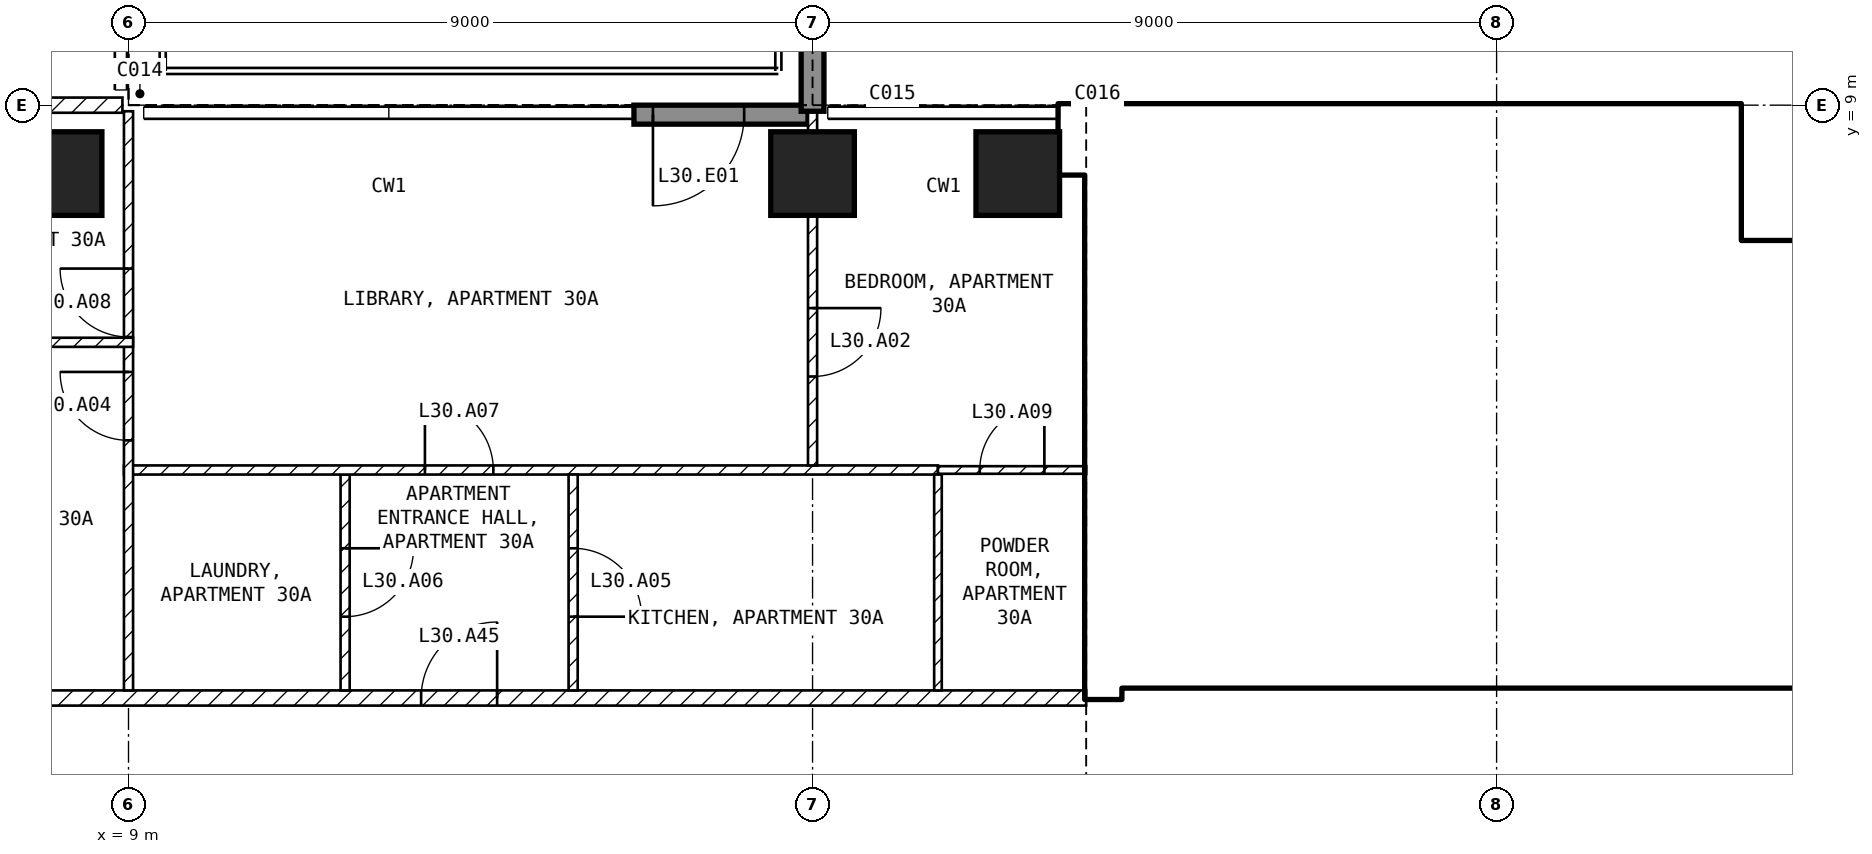
"""IFC4 building model, lengths in metres.
Left out: names, types, materials, properties, quantities, classifications, styles, units other than length and angle.
Written with IfcOpenShell. Run it as: python <this file> out.ifc"""

import sys

from ifc_helpers import new_model, si_unit, direction, frame, frame_2d, origin, origin_2d, place, context, subcontext, project, spatial, rectangle, extrude, element, fill, save


model = new_model("IFC4")
c1 = context("Model", 3, precision=1e-05, world=origin(), true_north=direction((0.0, 1.0)))
c2 = subcontext(c1, "Body", "Model", "MODEL_VIEW")
j1 = project(units=[si_unit("LENGTHUNIT", "METRE"), si_unit("PLANEANGLEUNIT", "RADIAN")], contexts=[c1])
p1 = place(None, origin())
s1 = spatial("IfcSite", under=j1, at=p1, CompositionType="ELEMENT")
p2 = place(p1, origin())
s2 = spatial("IfcBuilding", under=s1, at=p2, CompositionType="ELEMENT")
p3 = place(p2, frame((0.0, 0.0, 126.9)))
s3 = spatial("IfcBuildingStorey", under=s2, at=p3, CompositionType="ELEMENT", Elevation=126.9)
for number, where, z_axis, x_axis in (
    (1, (8.1, 8.1, -0.25), (0.0, 0.0, 1.0), (1.0, 0.0, 0.0)),
    (2, (18.0, 8.1, -0.25), (0.0, 0.0, 1.0), (1.0, 0.0, 0.0)),
    (3, (20.7, 8.1, -0.25), (0.0, 0.0, 1.0), (1.0, 0.0, 0.0)),
):
    element("IfcColumn", number, at=place(p3, frame(where, z_axis=z_axis, x_axis=x_axis)), inside=s3, PredefinedType="COLUMN", context=c2, shape_type="SweptSolid", body=[
        extrude(rectangle(XDim=1.1, YDim=1.1, at=origin_2d()), origin(), (0.0, 0.0, 1.0), 3.5),
    ])
p4 = place(p3, frame((17.94, 8.875, 0.0), z_axis=(0.0, 0.0, 1.0), x_axis=(-1.0, 0.0, 0.0)))
e4 = element("IfcWall", 4, at=p4, inside=s3, PredefinedType="SOLIDWALL", context=c2, shape_type="SweptSolid", body=[
    extrude(rectangle(XDim=2.29, YDim=0.25, at=frame_2d((1.145, 0.0))), origin(), (0.0, 0.0, 1.0), 3.25),
])
p5 = place(p4, frame((0.84, 0.0, 0.0)))
e5 = element("IfcOpeningElement", 5, at=p5, cuts=e4, PredefinedType="OPENING", context=c2, shape_type="SweptSolid", body=[
    extrude(rectangle(XDim=1.2, YDim=2.4, at=frame_2d((0.6, 1.2))), frame((0.0, 0.135, 0.0), z_axis=(0.0, -1.0, 0.0), x_axis=(1.0, 0.0, 0.0)), (0.0, 0.0, 1.0), 0.27),
])
p6 = place(p3, frame((18.0, 8.92, 0.0), z_axis=(0.0, 0.0, 1.0), x_axis=(0.0, 1.0, 0.0)))
e6 = element("IfcWall", 6, at=p6, inside=s3, PredefinedType="SOLIDWALL", context=c2, shape_type="SweptSolid", body=[
    extrude(rectangle(XDim=2.82, YDim=0.3, at=frame_2d((1.41, 0.0))), origin(), (0.0, 0.0, 1.0), 3.25),
])
p7 = place(p3, frame((29.075, 6.825, 0.0), z_axis=(0.0, 0.0, 1.0), x_axis=(1.0, 0.0, 0.0)))
e7 = element("IfcWall", 7, at=p7, inside=s3, PredefinedType="SHEAR", context=c2, shape_type="SweptSolid", body=[
    extrude(rectangle(XDim=2.175, YDim=0.75, at=frame_2d((1.087, 0.0))), origin(), (0.0, 0.0, 1.0), 3.25),
])
p8 = place(p3, frame((29.825, 7.2, 0.0), z_axis=(0.0, 0.0, 1.0), x_axis=(0.0, 1.0, 0.0)))
e8 = element("IfcWall", 8, at=p8, inside=s3, PredefinedType="SHEAR", context=c2, shape_type="SweptSolid", body=[
    extrude(rectangle(XDim=1.8, YDim=0.75, at=frame_2d((0.9, 0.0))), origin(), (0.0, 0.0, 1.0), 3.25),
])
p9 = place(p3, frame((21.25, 8.55, 0.0), z_axis=(0.0, 0.0, 1.0), x_axis=(1.0, 0.0, 0.0)))
e9 = element("IfcWall", 9, at=p9, inside=s3, PredefinedType="SHEAR", context=c2, shape_type="SweptSolid", body=[
    extrude(rectangle(XDim=8.2, YDim=0.9, at=frame_2d((4.1, 0.0))), origin(), (0.0, 0.0, 1.0), 3.25),
])
p10 = place(p3, frame((21.825, 1.2, 0.0), z_axis=(0.0, 0.0, 1.0), x_axis=(0.0, 1.0, 0.0)))
e10 = element("IfcWall", 10, at=p10, inside=s3, PredefinedType="SHEAR", context=c2, shape_type="SweptSolid", body=[
    extrude(rectangle(XDim=6.9, YDim=0.45, at=frame_2d((3.45, 0.0))), origin(), (0.0, 0.0, 1.0), 3.25),
])
p11 = place(p3, frame((22.05, 1.45, 0.0), z_axis=(0.0, 0.0, 1.0), x_axis=(1.0, 0.0, 0.0)))
e11 = element("IfcWall", 11, at=p11, inside=s3, PredefinedType="SOLIDWALL", context=c2, shape_type="SweptSolid", body=[
    extrude(rectangle(XDim=11.0, YDim=0.2, at=frame_2d((5.5, 0.0))), origin(), (0.0, 0.0, 1.0), 3.25),
])
p12 = place(p11, frame((0.75, 0.0, 0.0)))
e12 = element("IfcOpeningElement", 12, at=p12, cuts=e11, PredefinedType="OPENING", context=c2, shape_type="SweptSolid", body=[
    extrude(rectangle(XDim=1.0, YDim=2.1, at=frame_2d((0.5, 1.05))), frame((0.0, 0.11, 0.0), z_axis=(0.0, -1.0, 0.0), x_axis=(1.0, 0.0, 0.0)), (0.0, 0.0, 1.0), 0.22),
])
p13 = place(p11, frame((3.25, 0.0, 0.0)))
e13 = element("IfcOpeningElement", 13, at=p13, cuts=e11, PredefinedType="OPENING", context=c2, shape_type="SweptSolid", body=[
    extrude(rectangle(XDim=1.0, YDim=2.1, at=frame_2d((0.5, 1.05))), frame((0.0, 0.11, 0.0), z_axis=(0.0, -1.0, 0.0), x_axis=(1.0, 0.0, 0.0)), (0.0, 0.0, 1.0), 0.22),
])
p14 = place(p11, frame((9.075, 0.0, 0.0)))
e14 = element("IfcOpeningElement", 14, at=p14, cuts=e11, PredefinedType="OPENING", context=c2, shape_type="SweptSolid", body=[
    extrude(rectangle(XDim=0.9, YDim=2.1, at=frame_2d((0.45, 1.05))), frame((0.0, 0.11, 0.0), z_axis=(0.0, -1.0, 0.0), x_axis=(1.0, 0.0, 0.0)), (0.0, 0.0, 1.0), 0.22),
])
p15 = place(p3, frame((22.05, 5.15, 0.0), z_axis=(0.0, 0.0, 1.0), x_axis=(1.0, 0.0, 0.0)))
e15 = element("IfcWall", 15, at=p15, inside=s3, PredefinedType="SOLIDWALL", context=c2, shape_type="SweptSolid", body=[
    extrude(rectangle(XDim=6.3, YDim=0.2, at=frame_2d((3.15, 0.0))), origin(), (0.0, 0.0, 1.0), 3.25),
])
p16 = place(p15, frame((0.2, 0.0, 0.0)))
e16 = element("IfcOpeningElement", 16, at=p16, cuts=e15, PredefinedType="OPENING", context=c2, shape_type="SweptSolid", body=[
    extrude(rectangle(XDim=1.0, YDim=2.1, at=frame_2d((0.5, 1.05))), frame((0.0, 0.11, 0.0), z_axis=(0.0, -1.0, 0.0), x_axis=(1.0, 0.0, 0.0)), (0.0, 0.0, 1.0), 0.22),
])
p17 = place(p3, frame((28.25, 5.25, 0.0), z_axis=(0.0, 0.0, 1.0), x_axis=(0.0, 1.0, 0.0)))
e17 = element("IfcWall", 17, at=p17, inside=s3, PredefinedType="SOLIDWALL", context=c2, shape_type="SweptSolid", body=[
    extrude(rectangle(XDim=2.85, YDim=0.2, at=frame_2d((1.425, 0.0))), origin(), (0.0, 0.0, 1.0), 3.25),
])
p18 = place(p3, frame((27.2, 3.95, 0.0), z_axis=(0.0, 0.0, 1.0), x_axis=(1.0, 0.0, 0.0)))
e18 = element("IfcWall", 18, at=p18, inside=s3, PredefinedType="SOLIDWALL", context=c2, shape_type="SweptSolid", body=[
    extrude(rectangle(XDim=5.85, YDim=0.2, at=frame_2d((2.925, 0.0))), origin(), (0.0, 0.0, 1.0), 3.25),
])
p19 = place(p3, frame((27.1, 1.55, 0.0), z_axis=(0.0, 0.0, 1.0), x_axis=(0.0, 1.0, 0.0)))
e19 = element("IfcWall", 19, at=p19, inside=s3, PredefinedType="SOLIDWALL", context=c2, shape_type="SweptSolid", body=[
    extrude(rectangle(XDim=3.5, YDim=0.2, at=frame_2d((1.75, 0.0))), origin(), (0.0, 0.0, 1.0), 3.25),
])
p20 = place(p19, frame((0.6, 0.0, 0.0)))
e20 = element("IfcOpeningElement", 20, at=p20, cuts=e19, PredefinedType="OPENING", context=c2, shape_type="SweptSolid", body=[
    extrude(rectangle(XDim=1.1, YDim=2.1, at=frame_2d((0.55, 1.05))), frame((0.0, 0.11, 0.0), z_axis=(0.0, -1.0, 0.0), x_axis=(1.0, 0.0, 0.0)), (0.0, 0.0, 1.0), 0.22),
])
p21 = place(p19, frame((2.6, 0.0, 0.0)))
e21 = element("IfcOpeningElement", 21, at=p21, cuts=e19, PredefinedType="OPENING", context=c2, shape_type="SweptSolid", body=[
    extrude(rectangle(XDim=0.8, YDim=2.1, at=frame_2d((0.4, 1.05))), frame((0.0, 0.11, 0.0), z_axis=(0.0, -1.0, 0.0), x_axis=(1.0, 0.0, 0.0)), (0.0, 0.0, 1.0), 0.22),
])
p22 = place(p3, frame((30.0, 1.55, 0.0), z_axis=(0.0, 0.0, 1.0), x_axis=(0.0, 1.0, 0.0)))
e22 = element("IfcWall", 22, at=p22, inside=s3, PredefinedType="SOLIDWALL", context=c2, shape_type="SweptSolid", body=[
    extrude(rectangle(XDim=2.3, YDim=0.2, at=frame_2d((1.15, 0.0))), origin(), (0.0, 0.0, 1.0), 3.25),
])
p23 = place(p3, frame((29.0, 4.05, 0.0), z_axis=(0.0, 0.0, 1.0), x_axis=(0.0, 1.0, 0.0)))
e23 = element("IfcWall", 23, at=p23, inside=s3, PredefinedType="PARTITIONING", context=c2, shape_type="SweptSolid", body=[
    extrude(rectangle(XDim=4.05, YDim=0.15, at=frame_2d((2.025, 0.0))), origin(), (0.0, 0.0, 1.0), 3.25),
])
p24 = place(p23, frame((0.1, 0.0, 0.0)))
e24 = element("IfcOpeningElement", 24, at=p24, cuts=e23, PredefinedType="OPENING", context=c2, shape_type="SweptSolid", body=[
    extrude(rectangle(XDim=0.8, YDim=2.1, at=frame_2d((0.4, 1.05))), frame((0.0, 0.085, 0.0), z_axis=(0.0, -1.0, 0.0), x_axis=(1.0, 0.0, 0.0)), (0.0, 0.0, 1.0), 0.17),
])
p25 = place(p3, frame((4.4, 1.2, 0.0), z_axis=(0.0, 0.0, 1.0), x_axis=(1.0, 0.0, 0.0)))
e25 = element("IfcWall", 25, at=p25, inside=s3, PredefinedType="PARTITIONING", context=c2, shape_type="SweptSolid", body=[
    extrude(rectangle(XDim=17.2, YDim=0.2, at=frame_2d((8.6, 0.0))), origin(), (0.0, 0.0, 1.0), 3.25),
])
p26 = place(p25, frame((8.45, 0.0, 0.0)))
e26 = element("IfcOpeningElement", 26, at=p26, cuts=e25, PredefinedType="OPENING", context=c2, shape_type="SweptSolid", body=[
    extrude(rectangle(XDim=1.0, YDim=2.1, at=frame_2d((0.5, 1.05))), frame((0.0, 0.11, 0.0), z_axis=(0.0, -1.0, 0.0), x_axis=(1.0, 0.0, 0.0)), (0.0, 0.0, 1.0), 0.22),
])
p27 = place(p3, frame((-8.92, 9.0, 0.0), z_axis=(0.0, 0.0, 1.0), x_axis=(1.0, 0.0, 0.0)))
e27 = element("IfcWall", 27, at=p27, inside=s3, PredefinedType="PARTITIONING", context=c2, shape_type="SweptSolid", body=[
    extrude(rectangle(XDim=17.84, YDim=0.2, at=frame_2d((8.92, 0.0))), origin(), (0.0, 0.0, 1.0), 3.25),
])
p28 = place(p27, frame((8.42, 0.0, 0.0)))
e28 = element("IfcOpeningElement", 28, at=p28, cuts=e27, PredefinedType="OPENING", context=c2, shape_type="SweptSolid", body=[
    extrude(rectangle(XDim=1.0, YDim=2.1, at=frame_2d((0.5, 1.05))), frame((0.0, 0.11, 0.0), z_axis=(0.0, -1.0, 0.0), x_axis=(1.0, 0.0, 0.0)), (0.0, 0.0, 1.0), 0.22),
])
p29 = place(p3, frame((11.85, 4.14, 0.0), z_axis=(0.0, 0.0, 1.0), x_axis=(0.0, -1.0, 0.0)))
e29 = element("IfcWall", 29, at=p29, inside=s3, PredefinedType="PARTITIONING", context=c2, shape_type="SweptSolid", body=[
    extrude(rectangle(XDim=2.84, YDim=0.12, at=frame_2d((1.42, 0.0))), origin(), (0.0, 0.0, 1.0), 3.25),
])
p30 = place(p29, frame((0.97, 0.0, 0.0)))
e30 = element("IfcOpeningElement", 30, at=p30, cuts=e29, PredefinedType="OPENING", context=c2, shape_type="SweptSolid", body=[
    extrude(rectangle(XDim=0.9, YDim=2.1, at=frame_2d((0.45, 1.05))), frame((0.0, 0.07, 0.0), z_axis=(0.0, -1.0, 0.0), x_axis=(1.0, 0.0, 0.0)), (0.0, 0.0, 1.0), 0.14),
])
p31 = place(p3, frame((8.94, 4.2, 0.0), z_axis=(0.0, 0.0, 1.0), x_axis=(1.0, 0.0, 0.0)))
e31 = element("IfcWall", 31, at=p31, inside=s3, PredefinedType="PARTITIONING", context=c2, shape_type="SweptSolid", body=[
    extrude(rectangle(XDim=10.71, YDim=0.12, at=frame_2d((5.355, 0.0))), origin(), (0.0, 0.0, 1.0), 3.25),
])
p32 = place(p31, frame((3.96, 0.0, 0.0)))
e32 = element("IfcOpeningElement", 32, at=p32, cuts=e31, PredefinedType="OPENING", context=c2, shape_type="SweptSolid", body=[
    extrude(rectangle(XDim=0.9, YDim=2.1, at=frame_2d((0.45, 1.05))), frame((0.0, 0.07, 0.0), z_axis=(0.0, -1.0, 0.0), x_axis=(1.0, 0.0, 0.0)), (0.0, 0.0, 1.0), 0.14),
])
p33 = place(p3, frame((9.0, 1.3, 0.0), z_axis=(0.0, 0.0, 1.0), x_axis=(0.0, 1.0, 0.0)))
e33 = element("IfcWall", 33, at=p33, inside=s3, PredefinedType="PARTITIONING", context=c2, shape_type="SweptSolid", body=[
    extrude(rectangle(XDim=7.62, YDim=0.12, at=frame_2d((3.81, 0.0))), origin(), (0.0, 0.0, 1.0), 3.25),
])
p34 = place(p33, frame((3.29, 0.0, 0.0)))
e34 = element("IfcOpeningElement", 34, at=p34, cuts=e33, PredefinedType="OPENING", context=c2, shape_type="SweptSolid", body=[
    extrude(rectangle(XDim=0.9, YDim=2.1, at=frame_2d((0.45, 1.05))), frame((0.0, 0.07, 0.0), z_axis=(0.0, -1.0, 0.0), x_axis=(1.0, 0.0, 0.0)), (0.0, 0.0, 1.0), 0.14),
])
p35 = place(p33, frame((4.65, 0.0, 0.0)))
e35 = element("IfcOpeningElement", 35, at=p35, cuts=e33, PredefinedType="OPENING", context=c2, shape_type="SweptSolid", body=[
    extrude(rectangle(XDim=0.9, YDim=2.1, at=frame_2d((0.45, 1.05))), frame((0.0, 0.07, 0.0), z_axis=(0.0, -1.0, 0.0), x_axis=(1.0, 0.0, 0.0)), (0.0, 0.0, 1.0), 0.14),
])
p36 = place(p3, frame((14.85, 4.14, 0.0), z_axis=(0.0, 0.0, 1.0), x_axis=(0.0, -1.0, 0.0)))
e36 = element("IfcWall", 36, at=p36, inside=s3, PredefinedType="PARTITIONING", context=c2, shape_type="SweptSolid", body=[
    extrude(rectangle(XDim=2.84, YDim=0.12, at=frame_2d((1.42, 0.0))), origin(), (0.0, 0.0, 1.0), 3.25),
])
p37 = place(p36, frame((0.97, 0.0, 0.0)))
e37 = element("IfcOpeningElement", 37, at=p37, cuts=e36, PredefinedType="OPENING", context=c2, shape_type="SweptSolid", body=[
    extrude(rectangle(XDim=0.9, YDim=2.1, at=frame_2d((0.45, 1.05))), frame((0.0, 0.07, 0.0), z_axis=(0.0, -1.0, 0.0), x_axis=(1.0, 0.0, 0.0)), (0.0, 0.0, 1.0), 0.14),
])
p38 = place(p3, frame((19.65, 4.14, 0.0), z_axis=(0.0, 0.0, 1.0), x_axis=(0.0, -1.0, 0.0)))
e38 = element("IfcWall", 38, at=p38, inside=s3, PredefinedType="PARTITIONING", context=c2, shape_type="SweptSolid", body=[
    extrude(rectangle(XDim=2.84, YDim=0.1, at=frame_2d((1.42, 0.0))), origin(), (0.0, 0.0, 1.0), 3.25),
])
p39 = place(p3, frame((19.65, 4.2, 0.0), z_axis=(0.0, 0.0, 1.0), x_axis=(1.0, 0.0, 0.0)))
e39 = element("IfcWall", 39, at=p39, inside=s3, PredefinedType="PARTITIONING", context=c2, shape_type="SweptSolid", body=[
    extrude(rectangle(XDim=1.95, YDim=0.1, at=frame_2d((0.975, 0.0))), origin(), (0.0, 0.0, 1.0), 3.25),
])
p40 = place(p39, frame((0.55, 0.0, 0.0)))
e40 = element("IfcOpeningElement", 40, at=p40, cuts=e39, PredefinedType="OPENING", context=c2, shape_type="SweptSolid", body=[
    extrude(rectangle(XDim=0.85, YDim=2.1, at=frame_2d((0.425, 1.05))), frame((0.0, 0.06, 0.0), z_axis=(0.0, -1.0, 0.0), x_axis=(1.0, 0.0, 0.0)), (0.0, 0.0, 1.0), 0.12),
])
p41 = place(p3, frame((18.0, 8.92, 0.0), z_axis=(0.0, 0.0, 1.0), x_axis=(0.0, -1.0, 0.0)))
e41 = element("IfcWall", 41, at=p41, inside=s3, PredefinedType="PARTITIONING", context=c2, shape_type="SweptSolid", body=[
    extrude(rectangle(XDim=4.66, YDim=0.12, at=frame_2d((2.33, 0.0))), origin(), (0.0, 0.0, 1.0), 2.414),
])
p42 = place(p41, frame((2.59, 0.0, 0.0)))
e42 = element("IfcOpeningElement", 42, at=p42, cuts=e41, PredefinedType="OPENING", context=c2, shape_type="SweptSolid", body=[
    extrude(rectangle(XDim=0.9, YDim=2.1, at=frame_2d((0.45, 1.05))), frame((0.0, 0.07, 0.0), z_axis=(0.0, -1.0, 0.0), x_axis=(1.0, 0.0, 0.0)), (0.0, 0.0, 1.0), 0.14),
])
p43 = place(p3, frame((4.44, 5.88, 0.0), z_axis=(0.0, 0.0, 1.0), x_axis=(1.0, 0.0, 0.0)))
e43 = element("IfcWall", 43, at=p43, inside=s3, PredefinedType="PARTITIONING", context=c2, shape_type="SweptSolid", body=[
    extrude(rectangle(XDim=4.62, YDim=0.12, at=frame_2d((2.31, 0.0))), origin(), (0.0, 0.0, 1.0), 3.25),
])
p44 = place(p5, origin())
e44 = element("IfcDoor", 44, at=p44, inside=s3, OperationType="SINGLE_SWING_RIGHT", PredefinedType="DOOR", context=c2, shape_type="SweptSolid", body=[
    extrude(rectangle(XDim=1.2, YDim=2.4, at=frame_2d((0.6, 1.2))), frame((0.0, 0.025, 0.0), z_axis=(0.0, -1.0, 0.0), x_axis=(1.0, 0.0, 0.0)), (0.0, 0.0, 1.0), 0.05),
])
fill(e5, e44)
p45 = place(p20, origin())
e45 = element("IfcDoor", 45, at=p45, inside=s3, OperationType="DOUBLE_DOOR_SLIDING", PredefinedType="DOOR", context=c2, shape_type="SweptSolid", body=[
    extrude(rectangle(XDim=1.1, YDim=2.1, at=frame_2d((0.55, 1.05))), frame((0.0, 0.025, 0.0), z_axis=(0.0, -1.0, 0.0), x_axis=(1.0, 0.0, 0.0)), (0.0, 0.0, 1.0), 0.05),
])
fill(e20, e45)
p46 = place(p16, origin())
e46 = element("IfcDoor", 46, at=p46, inside=s3, OperationType="SINGLE_SWING_LEFT", PredefinedType="DOOR", context=c2, shape_type="SweptSolid", body=[
    extrude(rectangle(XDim=1.0, YDim=2.1, at=frame_2d((0.5, 1.05))), frame((0.0, 0.025, 0.0), z_axis=(0.0, -1.0, 0.0), x_axis=(1.0, 0.0, 0.0)), (0.0, 0.0, 1.0), 0.05),
])
fill(e16, e46)
p47 = place(p12, origin())
e47 = element("IfcDoor", 47, at=p47, inside=s3, OperationType="SINGLE_SWING_LEFT", PredefinedType="DOOR", context=c2, shape_type="SweptSolid", body=[
    extrude(rectangle(XDim=1.0, YDim=2.1, at=frame_2d((0.5, 1.05))), frame((0.0, 0.025, 0.0), z_axis=(0.0, -1.0, 0.0), x_axis=(1.0, 0.0, 0.0)), (0.0, 0.0, 1.0), 0.05),
])
fill(e12, e47)
p48 = place(p13, origin())
e48 = element("IfcDoor", 48, at=p48, inside=s3, OperationType="SINGLE_SWING_LEFT", PredefinedType="DOOR", context=c2, shape_type="SweptSolid", body=[
    extrude(rectangle(XDim=1.0, YDim=2.1, at=frame_2d((0.5, 1.05))), frame((0.0, 0.025, 0.0), z_axis=(0.0, -1.0, 0.0), x_axis=(1.0, 0.0, 0.0)), (0.0, 0.0, 1.0), 0.05),
])
fill(e13, e48)
p49 = place(p21, origin())
e49 = element("IfcDoor", 49, at=p49, inside=s3, OperationType="SINGLE_SWING_LEFT", PredefinedType="DOOR", context=c2, shape_type="SweptSolid", body=[
    extrude(rectangle(XDim=0.8, YDim=2.1, at=frame_2d((0.4, 1.05))), frame((0.0, 0.025, 0.0), z_axis=(0.0, -1.0, 0.0), x_axis=(1.0, 0.0, 0.0)), (0.0, 0.0, 1.0), 0.05),
])
fill(e21, e49)
p50 = place(p24, origin())
e50 = element("IfcDoor", 50, at=p50, inside=s3, OperationType="SINGLE_SWING_LEFT", PredefinedType="DOOR", context=c2, shape_type="SweptSolid", body=[
    extrude(rectangle(XDim=0.8, YDim=2.1, at=frame_2d((0.4, 1.05))), frame((0.0, 0.025, 0.0), z_axis=(0.0, -1.0, 0.0), x_axis=(1.0, 0.0, 0.0)), (0.0, 0.0, 1.0), 0.05),
])
fill(e24, e50)
p51 = place(p42, origin())
e51 = element("IfcDoor", 51, at=p51, inside=s3, OperationType="SINGLE_SWING_LEFT", PredefinedType="DOOR", context=c2, shape_type="SweptSolid", body=[
    extrude(rectangle(XDim=0.9, YDim=2.1, at=frame_2d((0.45, 1.05))), frame((0.0, 0.025, 0.0), z_axis=(0.0, -1.0, 0.0), x_axis=(1.0, 0.0, 0.0)), (0.0, 0.0, 1.0), 0.05),
])
fill(e42, e51)
p52 = place(p34, origin())
e52 = element("IfcDoor", 52, at=p52, inside=s3, OperationType="SINGLE_SWING_RIGHT", PredefinedType="DOOR", context=c2, shape_type="SweptSolid", body=[
    extrude(rectangle(XDim=0.9, YDim=2.1, at=frame_2d((0.45, 1.05))), frame((0.0, 0.025, 0.0), z_axis=(0.0, -1.0, 0.0), x_axis=(1.0, 0.0, 0.0)), (0.0, 0.0, 1.0), 0.05),
])
fill(e34, e52)
p53 = place(p37, origin())
e53 = element("IfcDoor", 53, at=p53, inside=s3, OperationType="SINGLE_SWING_RIGHT", PredefinedType="DOOR", context=c2, shape_type="SweptSolid", body=[
    extrude(rectangle(XDim=0.9, YDim=2.1, at=frame_2d((0.45, 1.05))), frame((0.0, 0.025, 0.0), z_axis=(0.0, -1.0, 0.0), x_axis=(1.0, 0.0, 0.0)), (0.0, 0.0, 1.0), 0.05),
])
fill(e37, e53)
p54 = place(p30, origin())
e54 = element("IfcDoor", 54, at=p54, inside=s3, OperationType="SINGLE_SWING_LEFT", PredefinedType="DOOR", context=c2, shape_type="SweptSolid", body=[
    extrude(rectangle(XDim=0.9, YDim=2.1, at=frame_2d((0.45, 1.05))), frame((0.0, 0.025, 0.0), z_axis=(0.0, -1.0, 0.0), x_axis=(1.0, 0.0, 0.0)), (0.0, 0.0, 1.0), 0.05),
])
fill(e30, e54)
p55 = place(p32, origin())
e55 = element("IfcDoor", 55, at=p55, inside=s3, OperationType="SINGLE_SWING_LEFT", PredefinedType="DOOR", context=c2, shape_type="SweptSolid", body=[
    extrude(rectangle(XDim=0.9, YDim=2.1, at=frame_2d((0.45, 1.05))), frame((0.0, 0.025, 0.0), z_axis=(0.0, -1.0, 0.0), x_axis=(1.0, 0.0, 0.0)), (0.0, 0.0, 1.0), 0.05),
])
fill(e32, e55)
p56 = place(p35, origin())
e56 = element("IfcDoor", 56, at=p56, inside=s3, OperationType="SINGLE_SWING_RIGHT", PredefinedType="DOOR", context=c2, shape_type="SweptSolid", body=[
    extrude(rectangle(XDim=0.9, YDim=2.1, at=frame_2d((0.45, 1.05))), frame((0.0, 0.025, 0.0), z_axis=(0.0, -1.0, 0.0), x_axis=(1.0, 0.0, 0.0)), (0.0, 0.0, 1.0), 0.05),
])
fill(e35, e56)
p57 = place(p40, origin())
e57 = element("IfcDoor", 57, at=p57, inside=s3, OperationType="SINGLE_SWING_RIGHT", PredefinedType="DOOR", context=c2, shape_type="SweptSolid", body=[
    extrude(rectangle(XDim=0.85, YDim=2.1, at=frame_2d((0.425, 1.05))), frame((0.0, 0.025, 0.0), z_axis=(0.0, -1.0, 0.0), x_axis=(1.0, 0.0, 0.0)), (0.0, 0.0, 1.0), 0.05),
])
fill(e40, e57)
p58 = place(p26, origin())
e58 = element("IfcDoor", 58, at=p58, inside=s3, OperationType="SINGLE_SWING_RIGHT", PredefinedType="DOOR", context=c2, shape_type="SweptSolid", body=[
    extrude(rectangle(XDim=1.0, YDim=2.1, at=frame_2d((0.5, 1.05))), frame((0.0, 0.025, 0.0), z_axis=(0.0, -1.0, 0.0), x_axis=(1.0, 0.0, 0.0)), (0.0, 0.0, 1.0), 0.05),
])
fill(e26, e58)
save(model, sys.argv[1])
